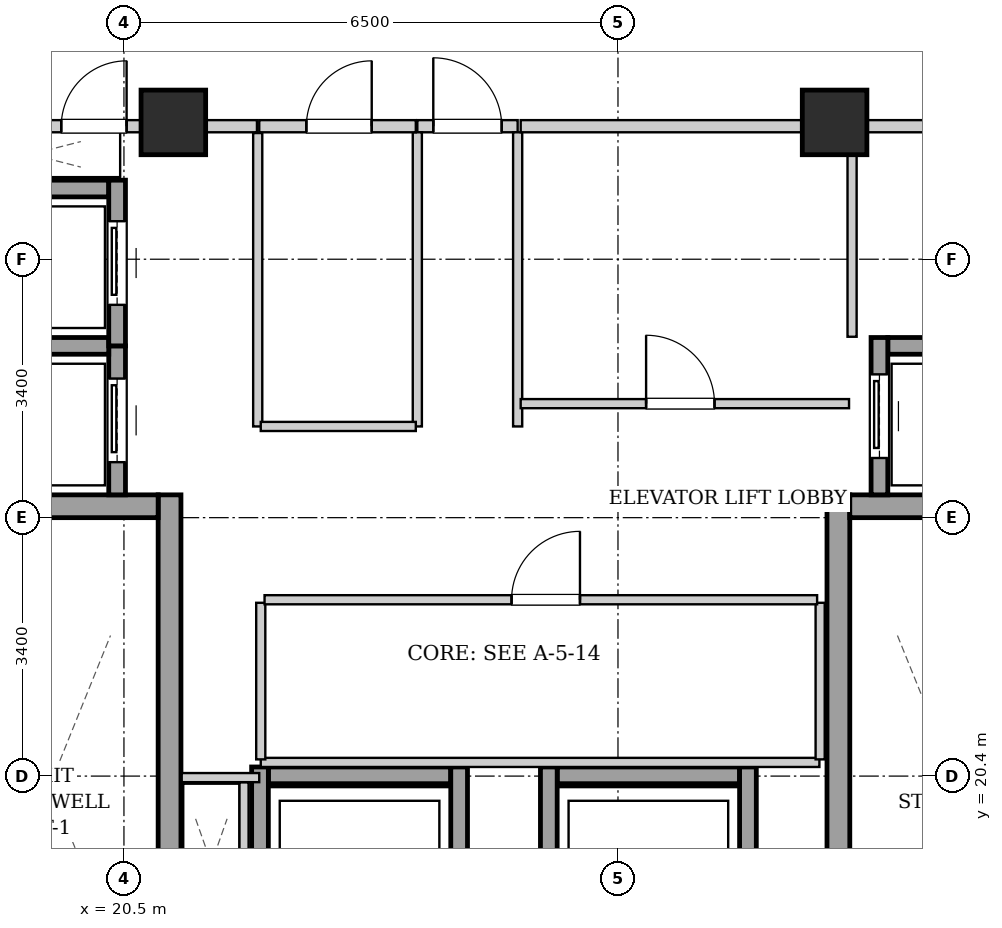
"""IFC4 building model, lengths in metres.
Left out: names, types, materials, properties, quantities, classifications, styles, units other than length and angle.
Written with IfcOpenShell. Run it as: python <this file> out.ifc"""

import sys

from ifc_helpers import new_model, si_unit, direction, frame, frame_2d, origin, origin_2d, place, context, subcontext, project, spatial, rectangle, extrude, element, fill, save


model = new_model("IFC4")
c1 = context("Model", 3, precision=1e-05, world=origin(), true_north=direction((0.0, 1.0)))
c2 = subcontext(c1, "Body", "Model", "MODEL_VIEW")
j1 = project(units=[si_unit("LENGTHUNIT", "METRE"), si_unit("PLANEANGLEUNIT", "RADIAN")], contexts=[c1])
p1 = place(None, origin())
s1 = spatial("IfcSite", under=j1, at=p1, CompositionType="ELEMENT")
p2 = place(p1, origin())
s2 = spatial("IfcBuilding", under=s1, at=p2, CompositionType="ELEMENT")
p3 = place(p2, frame((0.0, 0.0, 187.6)))
s3 = spatial("IfcBuildingStorey", under=s2, at=p3, CompositionType="ELEMENT", Elevation=187.6)
for number, where, z_axis, x_axis in (
    (1, (21.15, 29.0, 0.0), (0.0, 0.0, 1.0), (1.0, 0.0, 0.0)),
    (2, (29.85, 29.0, 0.0), (0.0, 0.0, 1.0), (1.0, 0.0, 0.0)),
):
    element("IfcColumn", number, at=place(p3, frame(where, z_axis=z_axis, x_axis=x_axis)), inside=s3, PredefinedType="COLUMN", context=c2, shape_type="SweptSolid", body=[
        extrude(rectangle(XDim=0.85, YDim=0.85, at=origin_2d()), origin(), (0.0, 0.0, 1.0), 3.3),
    ])
p4 = place(p3, frame((21.1, 15.1, 0.0), z_axis=(0.0, 0.0, 1.0), x_axis=(0.0, 1.0, 0.0)))
e3 = element("IfcWall", 3, at=p4, inside=s3, PredefinedType="SHEAR", context=c2, shape_type="SweptSolid", body=[
    extrude(rectangle(XDim=9.0, YDim=0.3, at=frame_2d((4.5, 0.0))), origin(), (0.0, 0.0, 1.0), 3.04),
])
p5 = place(p3, frame((18.1, 23.95, 0.0), z_axis=(0.0, 0.0, 1.0), x_axis=(1.0, 0.0, 0.0)))
e4 = element("IfcWall", 4, at=p5, inside=s3, PredefinedType="SHEAR", context=c2, shape_type="SweptSolid", body=[
    extrude(rectangle(XDim=2.85, YDim=0.3, at=frame_2d((1.425, 0.0))), origin(), (0.0, 0.0, 1.0), 3.04),
])
p6 = place(p3, frame((29.9, 15.1, 0.0), z_axis=(0.0, 0.0, 1.0), x_axis=(0.0, 1.0, 0.0)))
e5 = element("IfcWall", 5, at=p6, inside=s3, PredefinedType="SHEAR", context=c2, shape_type="SweptSolid", body=[
    extrude(rectangle(XDim=9.0, YDim=0.3, at=frame_2d((4.5, 0.0))), origin(), (0.0, 0.0, 1.0), 3.04),
])
p7 = place(p3, frame((30.05, 23.95, 0.0), z_axis=(0.0, 0.0, 1.0), x_axis=(1.0, 0.0, 0.0)))
e6 = element("IfcWall", 6, at=p7, inside=s3, PredefinedType="SHEAR", context=c2, shape_type="SweptSolid", body=[
    extrude(rectangle(XDim=2.85, YDim=0.3, at=frame_2d((1.425, 0.0))), origin(), (0.0, 0.0, 1.0), 3.04),
])
p8 = place(p3, frame((20.41, 24.1, 0.0), z_axis=(0.0, 0.0, 1.0), x_axis=(0.0, 1.0, 0.0)))
e7 = element("IfcWall", 7, at=p8, inside=s3, PredefinedType="SHEAR", context=c2, shape_type="SweptSolid", body=[
    extrude(rectangle(XDim=1.96, YDim=0.22, at=frame_2d((0.98, 0.0))), origin(), (0.0, 0.0, 1.0), 3.04),
])
p9 = place(p8, frame((0.43, 0.0, 0.0)))
e8 = element("IfcOpeningElement", 8, at=p9, cuts=e7, PredefinedType="OPENING", context=c2, shape_type="SweptSolid", body=[
    extrude(rectangle(XDim=1.1, YDim=2.15, at=frame_2d((0.55, 1.075))), frame((0.0, 0.12, 0.0), z_axis=(0.0, -1.0, 0.0), x_axis=(1.0, 0.0, 0.0)), (0.0, 0.0, 1.0), 0.24),
])
for number, where, z_axis, x_axis in (
    (9, (18.4, 26.06, 0.0), (0.0, 0.0, 1.0), (1.0, 0.0, 0.0)),
    (10, (18.4, 28.13, 0.0), (0.0, 0.0, 1.0), (1.0, 0.0, 0.0)),
):
    element("IfcWall", number, at=place(p3, frame(where, z_axis=z_axis, x_axis=x_axis)), inside=s3, PredefinedType="SHEAR", context=c2, shape_type="SweptSolid", body=[
        extrude(rectangle(XDim=1.9, YDim=0.22, at=frame_2d((0.95, 0.0))), origin(), (0.0, 0.0, 1.0), 3.04),
    ])
p10 = place(p3, frame((20.41, 26.06, 0.0), z_axis=(0.0, 0.0, 1.0), x_axis=(0.0, 1.0, 0.0)))
e11 = element("IfcWall", 11, at=p10, inside=s3, PredefinedType="SHEAR", context=c2, shape_type="SweptSolid", body=[
    extrude(rectangle(XDim=2.18, YDim=0.22, at=frame_2d((1.09, 0.0))), origin(), (0.0, 0.0, 1.0), 3.04),
])
p11 = place(p10, frame((0.54, 0.0, 0.0)))
e12 = element("IfcOpeningElement", 12, at=p11, cuts=e11, PredefinedType="OPENING", context=c2, shape_type="SweptSolid", body=[
    extrude(rectangle(XDim=1.1, YDim=2.15, at=frame_2d((0.55, 1.075))), frame((0.0, 0.12, 0.0), z_axis=(0.0, -1.0, 0.0), x_axis=(1.0, 0.0, 0.0)), (0.0, 0.0, 1.0), 0.24),
])
p12 = place(p3, frame((30.55, 26.06, 0.0), z_axis=(0.0, 0.0, 1.0), x_axis=(1.0, 0.0, 0.0)))
e13 = element("IfcWall", 13, at=p12, inside=s3, PredefinedType="SHEAR", context=c2, shape_type="SweptSolid", body=[
    extrude(rectangle(XDim=1.9, YDim=0.22, at=frame_2d((0.95, 0.0))), origin(), (0.0, 0.0, 1.0), 3.04),
])
p13 = place(p3, frame((30.44, 24.1, 0.0), z_axis=(0.0, 0.0, 1.0), x_axis=(0.0, 1.0, 0.0)))
e14 = element("IfcWall", 14, at=p13, inside=s3, PredefinedType="SHEAR", context=c2, shape_type="SweptSolid", body=[
    extrude(rectangle(XDim=2.07, YDim=0.22, at=frame_2d((1.035, 0.0))), origin(), (0.0, 0.0, 1.0), 3.04),
])
p14 = place(p13, frame((0.485, 0.0, 0.0)))
e15 = element("IfcOpeningElement", 15, at=p14, cuts=e14, PredefinedType="OPENING", context=c2, shape_type="SweptSolid", body=[
    extrude(rectangle(XDim=1.1, YDim=2.15, at=frame_2d((0.55, 1.075))), frame((0.0, 0.12, 0.0), z_axis=(0.0, -1.0, 0.0), x_axis=(1.0, 0.0, 0.0)), (0.0, 0.0, 1.0), 0.24),
])
p15 = place(p3, frame((22.4, 20.41, 0.0), z_axis=(0.0, 0.0, 1.0), x_axis=(1.0, 0.0, 0.0)))
e16 = element("IfcWall", 16, at=p15, inside=s3, PredefinedType="SHEAR", context=c2, shape_type="SweptSolid", body=[
    extrude(rectangle(XDim=2.4, YDim=0.22, at=frame_2d((1.2, 0.0))), origin(), (0.0, 0.0, 1.0), 3.04),
])
for number, where, z_axis, x_axis in (
    (17, (22.29, 17.98, 0.0), (0.0, 0.0, 1.0), (0.0, 1.0, 0.0)),
    (18, (24.91, 17.98, 0.0), (0.0, 0.0, 1.0), (0.0, 1.0, 0.0)),
):
    element("IfcWall", number, at=place(p3, frame(where, z_axis=z_axis, x_axis=x_axis)), inside=s3, PredefinedType="SHEAR", context=c2, shape_type="SweptSolid", body=[
        extrude(rectangle(XDim=2.54, YDim=0.22, at=frame_2d((1.27, 0.0))), origin(), (0.0, 0.0, 1.0), 3.04),
    ])
p16 = place(p3, frame((26.2, 20.41, 0.0), z_axis=(0.0, 0.0, 1.0), x_axis=(1.0, 0.0, 0.0)))
e19 = element("IfcWall", 19, at=p16, inside=s3, PredefinedType="SHEAR", context=c2, shape_type="SweptSolid", body=[
    extrude(rectangle(XDim=2.4, YDim=0.22, at=frame_2d((1.2, 0.0))), origin(), (0.0, 0.0, 1.0), 3.04),
])
for number, where, z_axis, x_axis in (
    (20, (26.09, 17.98, 0.0), (0.0, 0.0, 1.0), (0.0, 1.0, 0.0)),
    (21, (28.71, 17.98, 0.0), (0.0, 0.0, 1.0), (0.0, 1.0, 0.0)),
):
    element("IfcWall", number, at=place(p3, frame(where, z_axis=z_axis, x_axis=x_axis)), inside=s3, PredefinedType="SHEAR", context=c2, shape_type="SweptSolid", body=[
        extrude(rectangle(XDim=2.54, YDim=0.22, at=frame_2d((1.27, 0.0))), origin(), (0.0, 0.0, 1.0), 3.04),
    ])
p17 = place(p3, frame((24.36, 28.95, 0.0), z_axis=(0.0, 0.0, 1.0), x_axis=(1.0, 0.0, 0.0)))
e22 = element("IfcWall", 22, at=p17, inside=s3, PredefinedType="PARTITIONING", context=c2, shape_type="SweptSolid", body=[
    extrude(rectangle(XDim=1.32, YDim=0.16, at=frame_2d((0.66, 0.0))), origin(), (0.0, 0.0, 1.0), 2.556),
])
p18 = place(p17, frame((0.21, 0.0, 0.0)))
e23 = element("IfcOpeningElement", 23, at=p18, cuts=e22, PredefinedType="OPENING", context=c2, shape_type="SweptSolid", body=[
    extrude(rectangle(XDim=0.9, YDim=2.05, at=frame_2d((0.45, 1.025))), frame((0.0, 0.09, 0.0), z_axis=(0.0, -1.0, 0.0), x_axis=(1.0, 0.0, 0.0)), (0.0, 0.0, 1.0), 0.18),
])
p19 = place(p3, frame((17.96, 28.95, 0.0), z_axis=(0.0, 0.0, 1.0), x_axis=(1.0, 0.0, 0.0)))
e24 = element("IfcWall", 24, at=p19, inside=s3, PredefinedType="PARTITIONING", context=c2, shape_type="SweptSolid", body=[
    extrude(rectangle(XDim=4.29, YDim=0.16, at=frame_2d((2.145, 0.0))), origin(), (0.0, 0.0, 1.0), 2.556),
])
p20 = place(p19, frame((1.715, 0.0, 0.0)))
e25 = element("IfcOpeningElement", 25, at=p20, cuts=e24, PredefinedType="OPENING", context=c2, shape_type="SweptSolid", body=[
    extrude(rectangle(XDim=0.86, YDim=2.05, at=frame_2d((0.43, 1.025))), frame((0.0, 0.09, 0.0), z_axis=(0.0, -1.0, 0.0), x_axis=(1.0, 0.0, 0.0)), (0.0, 0.0, 1.0), 0.18),
])
p21 = place(p3, frame((22.08, 18.2, 0.0), z_axis=(0.0, 0.0, 1.0), x_axis=(0.0, 1.0, 0.0)))
e26 = element("IfcWall", 26, at=p21, inside=s3, PredefinedType="PARTITIONING", context=c2, shape_type="SweptSolid", body=[
    extrude(rectangle(XDim=2.12, YDim=0.12, at=frame_2d((1.06, 0.0))), origin(), (0.0, 0.0, 1.0), 3.04),
])
p22 = place(p3, frame((22.28, 20.38, 0.0), z_axis=(0.0, 0.0, 1.0), x_axis=(-1.0, 0.0, 0.0)))
e27 = element("IfcWall", 27, at=p22, inside=s3, PredefinedType="PARTITIONING", context=c2, shape_type="SweptSolid", body=[
    extrude(rectangle(XDim=1.02, YDim=0.12, at=frame_2d((0.51, 0.0))), origin(), (0.0, 0.0, 1.0), 3.04),
])
for number, where, z_axis, x_axis in (
    (28, (24.36, 25.0, 0.0), (0.0, 0.0, 1.0), (0.0, 1.0, 0.0)),
    (29, (25.68, 25.0, 0.0), (0.0, 0.0, 1.0), (0.0, 1.0, 0.0)),
):
    element("IfcWall", number, at=place(p3, frame(where, z_axis=z_axis, x_axis=x_axis)), inside=s3, PredefinedType="PARTITIONING", context=c2, shape_type="SweptSolid", body=[
        extrude(rectangle(XDim=3.87, YDim=0.12, at=frame_2d((1.935, 0.0))), origin(), (0.0, 0.0, 1.0), 3.04),
    ])
p23 = place(p3, frame((30.08, 26.18, 0.0), z_axis=(0.0, 0.0, 1.0), x_axis=(0.0, 1.0, 0.0)))
e30 = element("IfcWall", 30, at=p23, inside=s3, PredefinedType="PARTITIONING", context=c2, shape_type="SweptSolid", body=[
    extrude(rectangle(XDim=2.68, YDim=0.12, at=frame_2d((1.34, 0.0))), origin(), (0.0, 0.0, 1.0), 3.04),
])
p24 = place(p3, frame((30.08, 28.95, 0.0), z_axis=(0.0, 0.0, 1.0), x_axis=(1.0, 0.0, 0.0)))
e31 = element("IfcWall", 31, at=p24, inside=s3, PredefinedType="PARTITIONING", context=c2, shape_type="SweptSolid", body=[
    extrude(rectangle(XDim=2.96, YDim=0.16, at=frame_2d((1.48, 0.0))), origin(), (0.0, 0.0, 1.0), 3.04),
])
p25 = place(p24, frame((1.045, 0.0, 0.0)))
e32 = element("IfcOpeningElement", 32, at=p25, cuts=e31, PredefinedType="OPENING", context=c2, shape_type="SweptSolid", body=[
    extrude(rectangle(XDim=0.86, YDim=2.05, at=frame_2d((0.43, 1.025))), frame((0.0, 0.09, 0.0), z_axis=(0.0, -1.0, 0.0), x_axis=(1.0, 0.0, 0.0)), (0.0, 0.0, 1.0), 0.18),
])
p26 = place(p3, frame((22.26, 25.0, 0.0), z_axis=(0.0, 0.0, 1.0), x_axis=(0.0, 1.0, 0.0)))
e33 = element("IfcWall", 33, at=p26, inside=s3, PredefinedType="PARTITIONING", context=c2, shape_type="SweptSolid", body=[
    extrude(rectangle(XDim=3.86, YDim=0.12, at=frame_2d((1.93, 0.0))), origin(), (0.0, 0.0, 1.0), 3.04),
])
p27 = place(p3, frame((22.3, 25.0, 0.0), z_axis=(0.0, 0.0, 1.0), x_axis=(1.0, 0.0, 0.0)))
e34 = element("IfcWall", 34, at=p27, inside=s3, PredefinedType="PARTITIONING", context=c2, shape_type="SweptSolid", body=[
    extrude(rectangle(XDim=2.04, YDim=0.12, at=frame_2d((1.02, 0.0))), origin(), (0.0, 0.0, 1.0), 3.04),
])
p28 = place(p3, frame((22.28, 28.95, 0.0), z_axis=(0.0, 0.0, 1.0), x_axis=(1.0, 0.0, 0.0)))
e35 = element("IfcWall", 35, at=p28, inside=s3, PredefinedType="PARTITIONING", context=c2, shape_type="SweptSolid", body=[
    extrude(rectangle(XDim=2.06, YDim=0.16, at=frame_2d((1.03, 0.0))), origin(), (0.0, 0.0, 1.0), 2.556),
])
p29 = place(p28, frame((0.62, 0.0, 0.0)))
e36 = element("IfcOpeningElement", 36, at=p29, cuts=e35, PredefinedType="OPENING", context=c2, shape_type="SweptSolid", body=[
    extrude(rectangle(XDim=0.86, YDim=2.05, at=frame_2d((0.43, 1.025))), frame((0.0, 0.09, 0.0), z_axis=(0.0, -1.0, 0.0), x_axis=(1.0, 0.0, 0.0)), (0.0, 0.0, 1.0), 0.18),
])
p30 = place(p3, frame((25.72, 28.95, 0.0), z_axis=(0.0, 0.0, 1.0), x_axis=(1.0, 0.0, 0.0)))
e37 = element("IfcWall", 37, at=p30, inside=s3, PredefinedType="PARTITIONING", context=c2, shape_type="SweptSolid", body=[
    extrude(rectangle(XDim=4.32, YDim=0.16, at=frame_2d((2.16, 0.0))), origin(), (0.0, 0.0, 1.0), 2.556),
])
p31 = place(p3, frame((25.72, 25.3, 0.0), z_axis=(0.0, 0.0, 1.0), x_axis=(1.0, 0.0, 0.0)))
e38 = element("IfcWall", 38, at=p31, inside=s3, PredefinedType="PARTITIONING", context=c2, shape_type="SweptSolid", body=[
    extrude(rectangle(XDim=4.32, YDim=0.12, at=frame_2d((2.16, 0.0))), origin(), (0.0, 0.0, 1.0), 3.04),
])
p32 = place(p31, frame((1.65, 0.0, 0.0)))
e39 = element("IfcOpeningElement", 39, at=p32, cuts=e38, PredefinedType="OPENING", context=c2, shape_type="SweptSolid", body=[
    extrude(rectangle(XDim=0.9, YDim=2.05, at=frame_2d((0.45, 1.025))), frame((0.0, 0.07, 0.0), z_axis=(0.0, -1.0, 0.0), x_axis=(1.0, 0.0, 0.0)), (0.0, 0.0, 1.0), 0.14),
])
p33 = place(p3, frame((22.3, 20.58, 0.0), z_axis=(0.0, 0.0, 1.0), x_axis=(1.0, 0.0, 0.0)))
e40 = element("IfcWall", 40, at=p33, inside=s3, PredefinedType="PARTITIONING", context=c2, shape_type="SweptSolid", body=[
    extrude(rectangle(XDim=7.35, YDim=0.12, at=frame_2d((3.675, 0.0))), origin(), (0.0, 0.0, 1.0), 3.04),
])
for number, where, z_axis, x_axis in (
    (41, (22.3, 20.62, 0.0), (0.0, 0.0, 1.0), (0.0, 1.0, 0.0)),
    (42, (29.66, 20.62, 0.0), (0.0, 0.0, 1.0), (0.0, 1.0, 0.0)),
):
    element("IfcWall", number, at=place(p3, frame(where, z_axis=z_axis, x_axis=x_axis)), inside=s3, PredefinedType="PARTITIONING", context=c2, shape_type="SweptSolid", body=[
        extrude(rectangle(XDim=2.06, YDim=0.12, at=frame_2d((1.03, 0.0))), origin(), (0.0, 0.0, 1.0), 3.04),
    ])
p34 = place(p3, frame((22.35, 22.72, 0.0), z_axis=(0.0, 0.0, 1.0), x_axis=(1.0, 0.0, 0.0)))
e43 = element("IfcWall", 43, at=p34, inside=s3, PredefinedType="PARTITIONING", context=c2, shape_type="SweptSolid", body=[
    extrude(rectangle(XDim=7.27, YDim=0.12, at=frame_2d((3.635, 0.0))), origin(), (0.0, 0.0, 1.0), 3.04),
])
p35 = place(p34, frame((3.25, 0.0, 0.0)))
e44 = element("IfcOpeningElement", 44, at=p35, cuts=e43, PredefinedType="OPENING", context=c2, shape_type="SweptSolid", body=[
    extrude(rectangle(XDim=0.9, YDim=2.05, at=frame_2d((0.45, 1.025))), frame((0.0, 0.07, 0.0), z_axis=(0.0, -1.0, 0.0), x_axis=(1.0, 0.0, 0.0)), (0.0, 0.0, 1.0), 0.14),
])
p36 = place(p9, origin())
e45 = element("IfcDoor", 45, at=p36, inside=s3, OperationType="SLIDING_TO_LEFT", PredefinedType="DOOR", context=c2, shape_type="SweptSolid", body=[
    extrude(rectangle(XDim=1.1, YDim=2.15, at=frame_2d((0.55, 1.075))), frame((0.0, 0.025, 0.0), z_axis=(0.0, -1.0, 0.0), x_axis=(1.0, 0.0, 0.0)), (0.0, 0.0, 1.0), 0.05),
])
fill(e8, e45)
p37 = place(p11, origin())
e46 = element("IfcDoor", 46, at=p37, inside=s3, OperationType="SLIDING_TO_LEFT", PredefinedType="DOOR", context=c2, shape_type="SweptSolid", body=[
    extrude(rectangle(XDim=1.1, YDim=2.15, at=frame_2d((0.55, 1.075))), frame((0.0, 0.025, 0.0), z_axis=(0.0, -1.0, 0.0), x_axis=(1.0, 0.0, 0.0)), (0.0, 0.0, 1.0), 0.05),
])
fill(e12, e46)
p38 = place(p14, origin())
e47 = element("IfcDoor", 47, at=p38, inside=s3, OperationType="SLIDING_TO_LEFT", PredefinedType="DOOR", context=c2, shape_type="SweptSolid", body=[
    extrude(rectangle(XDim=1.1, YDim=2.15, at=frame_2d((0.55, 1.075))), frame((0.0, 0.025, 0.0), z_axis=(0.0, -1.0, 0.0), x_axis=(1.0, 0.0, 0.0)), (0.0, 0.0, 1.0), 0.05),
])
fill(e15, e47)
p39 = place(p18, origin())
e48 = element("IfcDoor", 48, at=p39, inside=s3, OperationType="SINGLE_SWING_LEFT", PredefinedType="DOOR", context=c2, shape_type="SweptSolid", body=[
    extrude(rectangle(XDim=0.9, YDim=2.05, at=frame_2d((0.45, 1.025))), frame((0.0, 0.025, 0.0), z_axis=(0.0, -1.0, 0.0), x_axis=(1.0, 0.0, 0.0)), (0.0, 0.0, 1.0), 0.05),
])
fill(e23, e48)
p40 = place(p20, origin())
e49 = element("IfcDoor", 49, at=p40, inside=s3, OperationType="SINGLE_SWING_RIGHT", PredefinedType="DOOR", context=c2, shape_type="SweptSolid", body=[
    extrude(rectangle(XDim=0.86, YDim=2.05, at=frame_2d((0.43, 1.025))), frame((0.0, 0.025, 0.0), z_axis=(0.0, -1.0, 0.0), x_axis=(1.0, 0.0, 0.0)), (0.0, 0.0, 1.0), 0.05),
])
fill(e25, e49)
p41 = place(p29, origin())
e50 = element("IfcDoor", 50, at=p41, inside=s3, OperationType="SINGLE_SWING_RIGHT", PredefinedType="DOOR", context=c2, shape_type="SweptSolid", body=[
    extrude(rectangle(XDim=0.86, YDim=2.05, at=frame_2d((0.43, 1.025))), frame((0.0, 0.025, 0.0), z_axis=(0.0, -1.0, 0.0), x_axis=(1.0, 0.0, 0.0)), (0.0, 0.0, 1.0), 0.05),
])
fill(e36, e50)
p42 = place(p32, origin())
e51 = element("IfcDoor", 51, at=p42, inside=s3, OperationType="SINGLE_SWING_LEFT", PredefinedType="DOOR", context=c2, shape_type="SweptSolid", body=[
    extrude(rectangle(XDim=0.9, YDim=2.05, at=frame_2d((0.45, 1.025))), frame((0.0, 0.025, 0.0), z_axis=(0.0, -1.0, 0.0), x_axis=(1.0, 0.0, 0.0)), (0.0, 0.0, 1.0), 0.05),
])
fill(e39, e51)
p43 = place(p35, origin())
e52 = element("IfcDoor", 52, at=p43, inside=s3, OperationType="SINGLE_SWING_RIGHT", PredefinedType="DOOR", context=c2, shape_type="SweptSolid", body=[
    extrude(rectangle(XDim=0.9, YDim=2.05, at=frame_2d((0.45, 1.025))), frame((0.0, 0.025, 0.0), z_axis=(0.0, -1.0, 0.0), x_axis=(1.0, 0.0, 0.0)), (0.0, 0.0, 1.0), 0.05),
])
fill(e44, e52)
save(model, sys.argv[1])
